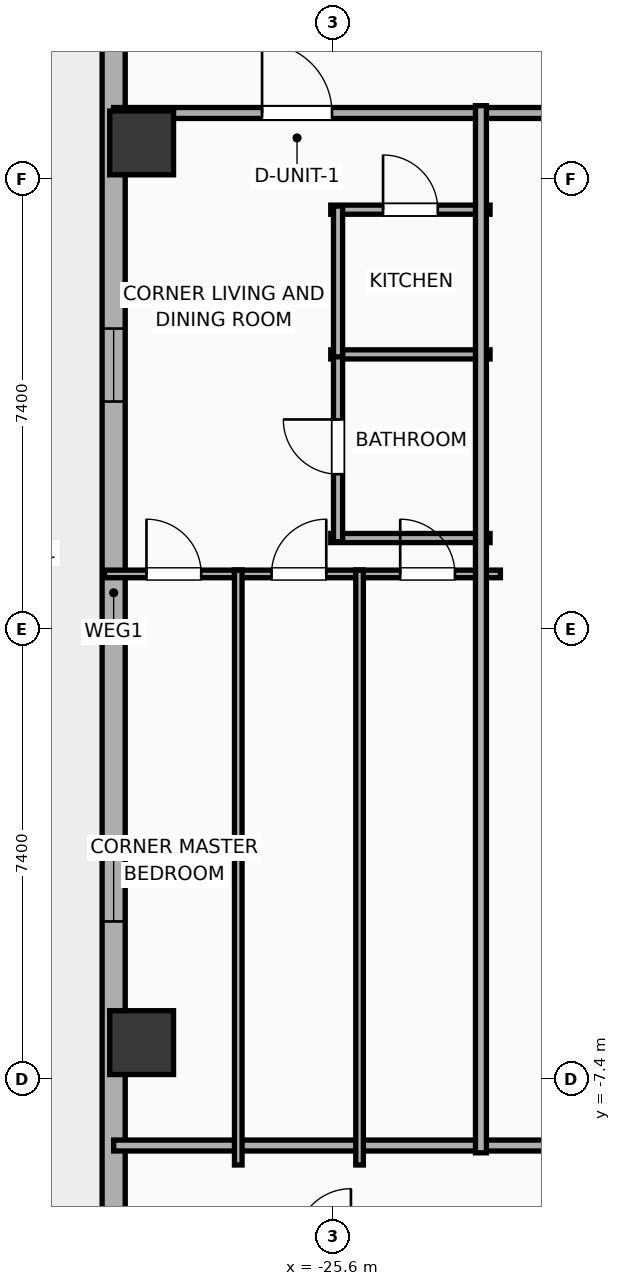
"""IFC4 building model, lengths in metres.
Left out: names, types, materials, properties, quantities, classifications, styles, units other than length and angle.
Written with IfcOpenShell. Run it as: python <this file> out.ifc"""

import sys

from ifc_helpers import new_model, si_unit, direction, frame, frame_2d, origin, origin_2d, place, context, subcontext, project, spatial, rectangle, hollow_rectangle, extrude, element, fill, save


model = new_model("IFC4")
c1 = context("Model", 3, precision=1e-05, world=origin(), true_north=direction((0.0, 1.0)))
c2 = subcontext(c1, "Body", "Model", "MODEL_VIEW")
j1 = project(units=[si_unit("LENGTHUNIT", "METRE"), si_unit("PLANEANGLEUNIT", "RADIAN")], contexts=[c1])
p1 = place(None, origin())
s1 = spatial("IfcSite", under=j1, at=p1, CompositionType="ELEMENT")
p2 = place(p1, origin())
s2 = spatial("IfcBuilding", under=s1, at=p2, CompositionType="ELEMENT")
p3 = place(p2, frame((0.0, 0.0, 113.1)))
s3 = spatial("IfcBuildingStorey", under=s2, at=p3, CompositionType="ELEMENT", Elevation=113.1)
for number, where, z_axis, x_axis in (
    (1, (-28.75, 7.998, 0.0), (0.0, 0.0, 1.0), (1.0, 0.0, 0.0)),
    (2, (-28.75, -6.798, 0.0), (0.0, 0.0, 1.0), (1.0, 0.0, 0.0)),
):
    element("IfcColumn", number, at=place(p3, frame(where, z_axis=z_axis, x_axis=x_axis)), inside=s3, PredefinedType="COLUMN", context=c2, shape_type="SweptSolid", body=[
        extrude(hollow_rectangle(XDim=1.05, YDim=1.05, WallThickness=0.036, at=origin_2d()), origin(), (0.0, 0.0, 1.0), 3.9),
    ])
p4 = place(p3, frame((-29.21, -16.581, 0.0), z_axis=(0.0, 0.0, 1.0), x_axis=(0.0, 1.0, 0.0)))
e3 = element("IfcWall", 3, at=p4, inside=s3, PredefinedType="ELEMENTEDWALL", context=c2, shape_type="SweptSolid", body=[
    extrude(rectangle(XDim=34.363, YDim=0.38, at=frame_2d((17.181, 0.0))), origin(), (0.0, 0.0, 1.0), 3.65),
])
p5 = place(p4, frame((30.757, 0.0, 0.75)))
e4 = element("IfcOpeningElement", 4, at=p5, cuts=e3, PredefinedType="OPENING", context=c2, shape_type="SweptSolid", body=[
    extrude(rectangle(XDim=1.2, YDim=2.05, at=frame_2d((0.6, 1.025))), frame((0.0, 0.2, 0.0), z_axis=(0.0, -1.0, 0.0), x_axis=(1.0, 0.0, 0.0)), (0.0, 0.0, 1.0), 0.4),
])
p6 = place(p4, frame((20.326, 0.0, 0.75)))
e5 = element("IfcOpeningElement", 5, at=p6, cuts=e3, PredefinedType="OPENING", context=c2, shape_type="SweptSolid", body=[
    extrude(rectangle(XDim=1.2, YDim=2.05, at=frame_2d((0.6, 1.025))), frame((0.0, 0.2, 0.0), z_axis=(0.0, -1.0, 0.0), x_axis=(1.0, 0.0, 0.0)), (0.0, 0.0, 1.0), 0.4),
])
p7 = place(p4, frame((11.776, 0.0, 0.75)))
e6 = element("IfcOpeningElement", 6, at=p7, cuts=e3, PredefinedType="OPENING", context=c2, shape_type="SweptSolid", body=[
    extrude(rectangle(XDim=1.2, YDim=2.05, at=frame_2d((0.6, 1.025))), frame((0.0, 0.2, 0.0), z_axis=(0.0, -1.0, 0.0), x_axis=(1.0, 0.0, 0.0)), (0.0, 0.0, 1.0), 0.4),
])
p8 = place(p3, frame((-29.21, 8.49, 0.0), z_axis=(0.0, 0.0, 1.0), x_axis=(1.0, 0.0, 0.0)))
e7 = element("IfcWall", 7, at=p8, inside=s3, PredefinedType="PARTITIONING", context=c2, shape_type="SweptSolid", body=[
    extrude(rectangle(XDim=19.33, YDim=0.18, at=frame_2d((9.665, 0.0))), origin(), (0.0, 0.0, 1.0), 3.65),
])
p9 = place(p8, frame((2.44, 0.0, 0.0)))
e8 = element("IfcOpeningElement", 8, at=p9, cuts=e7, PredefinedType="OPENING", context=c2, shape_type="SweptSolid", body=[
    extrude(rectangle(XDim=1.15, YDim=2.05, at=frame_2d((0.575, 1.025))), frame((0.0, 0.1, 0.0), z_axis=(0.0, -1.0, 0.0), x_axis=(1.0, 0.0, 0.0)), (0.0, 0.0, 1.0), 0.2),
])
p10 = place(p3, frame((-29.21, -8.49, 0.0), z_axis=(0.0, 0.0, 1.0), x_axis=(1.0, 0.0, 0.0)))
e9 = element("IfcWall", 9, at=p10, inside=s3, PredefinedType="PARTITIONING", context=c2, shape_type="SweptSolid", body=[
    extrude(rectangle(XDim=19.33, YDim=0.18, at=frame_2d((9.665, 0.0))), origin(), (0.0, 0.0, 1.0), 3.65),
])
p11 = place(p3, frame((-25.64, 6.9, 0.0), z_axis=(0.0, 0.0, 1.0), x_axis=(1.0, 0.0, 0.0)))
e10 = element("IfcWall", 10, at=p11, inside=s3, PredefinedType="PLUMBINGWALL", context=c2, shape_type="SweptSolid", body=[
    extrude(rectangle(XDim=2.62, YDim=0.15, at=frame_2d((1.31, 0.0))), origin(), (0.0, 0.0, 1.0), 3.65),
])
p12 = place(p11, frame((0.86, 0.0, 0.0)))
e11 = element("IfcOpeningElement", 11, at=p12, cuts=e10, PredefinedType="OPENING", context=c2, shape_type="SweptSolid", body=[
    extrude(rectangle(XDim=0.9, YDim=2.05, at=frame_2d((0.45, 1.025))), frame((0.0, 0.085, 0.0), z_axis=(0.0, -1.0, 0.0), x_axis=(1.0, 0.0, 0.0)), (0.0, 0.0, 1.0), 0.17),
])
for number, where, z_axis, x_axis in (
    (12, (-25.64, 4.52, 0.0), (0.0, 0.0, 1.0), (1.0, 0.0, 0.0)),
    (13, (-25.64, 1.5, 0.0), (0.0, 0.0, 1.0), (1.0, 0.0, 0.0)),
):
    element("IfcWall", number, at=place(p3, frame(where, z_axis=z_axis, x_axis=x_axis)), inside=s3, PredefinedType="PLUMBINGWALL", context=c2, shape_type="SweptSolid", body=[
        extrude(rectangle(XDim=2.62, YDim=0.15, at=frame_2d((1.31, 0.0))), origin(), (0.0, 0.0, 1.0), 3.65),
    ])
p13 = place(p3, frame((-25.52, 1.44, 0.0), z_axis=(0.0, 0.0, 1.0), x_axis=(0.0, 1.0, 0.0)))
e14 = element("IfcWall", 14, at=p13, inside=s3, PredefinedType="PLUMBINGWALL", context=c2, shape_type="SweptSolid", body=[
    extrude(rectangle(XDim=3.12, YDim=0.15, at=frame_2d((1.56, 0.0))), origin(), (0.0, 0.0, 1.0), 3.65),
])
p14 = place(p13, frame((1.11, 0.0, 0.0)))
e15 = element("IfcOpeningElement", 15, at=p14, cuts=e14, PredefinedType="OPENING", context=c2, shape_type="SweptSolid", body=[
    extrude(rectangle(XDim=0.9, YDim=2.05, at=frame_2d((0.45, 1.025))), frame((0.0, 0.085, 0.0), z_axis=(0.0, -1.0, 0.0), x_axis=(1.0, 0.0, 0.0)), (0.0, 0.0, 1.0), 0.17),
])
p15 = place(p3, frame((-25.52, 4.48, 0.0), z_axis=(0.0, 0.0, 1.0), x_axis=(0.0, 1.0, 0.0)))
e16 = element("IfcWall", 16, at=p15, inside=s3, PredefinedType="PLUMBINGWALL", context=c2, shape_type="SweptSolid", body=[
    extrude(rectangle(XDim=2.48, YDim=0.15, at=frame_2d((1.24, 0.0))), origin(), (0.0, 0.0, 1.0), 3.65),
])
p16 = place(p3, frame((-29.36, 0.91, 0.0), z_axis=(0.0, 0.0, 1.0), x_axis=(1.0, 0.0, 0.0)))
e17 = element("IfcWall", 17, at=p16, inside=s3, PredefinedType="PARTITIONING", context=c2, shape_type="SweptSolid", body=[
    extrude(rectangle(XDim=2.262, YDim=0.125, at=frame_2d((1.131, 0.0))), origin(), (0.0, 0.0, 1.0), 3.65),
])
p17 = place(p16, frame((0.689, 0.0, 0.0)))
e18 = element("IfcOpeningElement", 18, at=p17, cuts=e17, PredefinedType="OPENING", context=c2, shape_type="SweptSolid", body=[
    extrude(rectangle(XDim=0.9, YDim=2.05, at=frame_2d((0.45, 1.025))), frame((0.0, 0.073, 0.0), z_axis=(0.0, -1.0, 0.0), x_axis=(1.0, 0.0, 0.0)), (0.0, 0.0, 1.0), 0.145),
])
p18 = place(p3, frame((-27.223, 0.91, 0.0), z_axis=(0.0, 0.0, 1.0), x_axis=(1.0, 0.0, 0.0)))
e19 = element("IfcWall", 19, at=p18, inside=s3, PredefinedType="PARTITIONING", context=c2, shape_type="SweptSolid", body=[
    extrude(rectangle(XDim=2.12, YDim=0.125, at=frame_2d((1.06, 0.0))), origin(), (0.0, 0.0, 1.0), 3.65),
])
p19 = place(p18, frame((0.61, 0.0, 0.0)))
e20 = element("IfcOpeningElement", 20, at=p19, cuts=e19, PredefinedType="OPENING", context=c2, shape_type="SweptSolid", body=[
    extrude(rectangle(XDim=0.9, YDim=2.05, at=frame_2d((0.45, 1.025))), frame((0.0, 0.073, 0.0), z_axis=(0.0, -1.0, 0.0), x_axis=(1.0, 0.0, 0.0)), (0.0, 0.0, 1.0), 0.145),
])
p20 = place(p3, frame((-25.229, 0.91, 0.0), z_axis=(0.0, 0.0, 1.0), x_axis=(1.0, 0.0, 0.0)))
e21 = element("IfcWall", 21, at=p20, inside=s3, PredefinedType="PARTITIONING", context=c2, shape_type="SweptSolid", body=[
    extrude(rectangle(XDim=2.378, YDim=0.125, at=frame_2d((1.189, 0.0))), origin(), (0.0, 0.0, 1.0), 3.65),
])
p21 = place(p20, frame((0.73, 0.0, 0.0)))
e22 = element("IfcOpeningElement", 22, at=p21, cuts=e21, PredefinedType="OPENING", context=c2, shape_type="SweptSolid", body=[
    extrude(rectangle(XDim=0.9, YDim=2.05, at=frame_2d((0.45, 1.025))), frame((0.0, 0.073, 0.0), z_axis=(0.0, -1.0, 0.0), x_axis=(1.0, 0.0, 0.0)), (0.0, 0.0, 1.0), 0.145),
])
for number, where, z_axis, x_axis in (
    (23, (-25.166, -8.81, 0.0), (0.0, 0.0, 1.0), (0.0, 1.0, 0.0)),
    (24, (-27.161, -8.81, 0.0), (0.0, 0.0, 1.0), (0.0, 1.0, 0.0)),
):
    element("IfcWall", number, at=place(p3, frame(where, z_axis=z_axis, x_axis=x_axis)), inside=s3, PredefinedType="PARTITIONING", context=c2, shape_type="SweptSolid", body=[
        extrude(rectangle(XDim=9.78, YDim=0.125, at=frame_2d((4.89, 0.0))), origin(), (0.0, 0.0, 1.0), 3.65),
    ])
p22 = place(p3, frame((-23.17, -8.61, 0.0), z_axis=(0.0, 0.0, 1.0), x_axis=(0.0, 1.0, 0.0)))
e25 = element("IfcWall", 25, at=p22, inside=s3, PredefinedType="PARTITIONING", context=c2, shape_type="SweptSolid", body=[
    extrude(rectangle(XDim=17.22, YDim=0.18, at=frame_2d((8.61, 0.0))), origin(), (0.0, 0.0, 1.0), 3.65),
])
p23 = place(p6, origin())
e26 = element("IfcWindow", 26, at=p23, inside=s3, PartitioningType="SINGLE_PANEL", PredefinedType="WINDOW", context=c2, shape_type="SweptSolid", body=[
    extrude(rectangle(XDim=1.2, YDim=2.05, at=frame_2d((0.6, 1.025))), frame((0.0, 0.03, 0.0), z_axis=(0.0, -1.0, 0.0), x_axis=(1.0, 0.0, 0.0)), (0.0, 0.0, 1.0), 0.06),
])
fill(e5, e26)
p24 = place(p7, origin())
e27 = element("IfcWindow", 27, at=p24, inside=s3, PartitioningType="SINGLE_PANEL", PredefinedType="WINDOW", context=c2, shape_type="SweptSolid", body=[
    extrude(rectangle(XDim=1.2, YDim=2.05, at=frame_2d((0.6, 1.025))), frame((0.0, 0.03, 0.0), z_axis=(0.0, -1.0, 0.0), x_axis=(1.0, 0.0, 0.0)), (0.0, 0.0, 1.0), 0.06),
])
fill(e6, e27)
p25 = place(p9, origin())
e28 = element("IfcDoor", 28, at=p25, inside=s3, OperationType="SINGLE_SWING_LEFT", PredefinedType="DOOR", context=c2, shape_type="SweptSolid", body=[
    extrude(rectangle(XDim=1.15, YDim=2.05, at=frame_2d((0.575, 1.025))), frame((0.0, 0.025, 0.0), z_axis=(0.0, -1.0, 0.0), x_axis=(1.0, 0.0, 0.0)), (0.0, 0.0, 1.0), 0.05),
])
fill(e8, e28)
p26 = place(p12, origin())
e29 = element("IfcDoor", 29, at=p26, inside=s3, OperationType="SINGLE_SWING_LEFT", PredefinedType="DOOR", context=c2, shape_type="SweptSolid", body=[
    extrude(rectangle(XDim=0.9, YDim=2.05, at=frame_2d((0.45, 1.025))), frame((0.0, 0.025, 0.0), z_axis=(0.0, -1.0, 0.0), x_axis=(1.0, 0.0, 0.0)), (0.0, 0.0, 1.0), 0.05),
])
fill(e11, e29)
p27 = place(p14, origin())
e30 = element("IfcDoor", 30, at=p27, inside=s3, OperationType="SINGLE_SWING_RIGHT", PredefinedType="DOOR", context=c2, shape_type="SweptSolid", body=[
    extrude(rectangle(XDim=0.9, YDim=2.05, at=frame_2d((0.45, 1.025))), frame((0.0, 0.025, 0.0), z_axis=(0.0, -1.0, 0.0), x_axis=(1.0, 0.0, 0.0)), (0.0, 0.0, 1.0), 0.05),
])
fill(e15, e30)
p28 = place(p17, origin())
e31 = element("IfcDoor", 31, at=p28, inside=s3, OperationType="SINGLE_SWING_LEFT", PredefinedType="DOOR", context=c2, shape_type="SweptSolid", body=[
    extrude(rectangle(XDim=0.9, YDim=2.05, at=frame_2d((0.45, 1.025))), frame((0.0, 0.025, 0.0), z_axis=(0.0, -1.0, 0.0), x_axis=(1.0, 0.0, 0.0)), (0.0, 0.0, 1.0), 0.05),
])
fill(e18, e31)
p29 = place(p19, origin())
e32 = element("IfcDoor", 32, at=p29, inside=s3, OperationType="SINGLE_SWING_RIGHT", PredefinedType="DOOR", context=c2, shape_type="SweptSolid", body=[
    extrude(rectangle(XDim=0.9, YDim=2.05, at=frame_2d((0.45, 1.025))), frame((0.0, 0.025, 0.0), z_axis=(0.0, -1.0, 0.0), x_axis=(1.0, 0.0, 0.0)), (0.0, 0.0, 1.0), 0.05),
])
fill(e20, e32)
p30 = place(p21, origin())
e33 = element("IfcDoor", 33, at=p30, inside=s3, OperationType="SINGLE_SWING_LEFT", PredefinedType="DOOR", context=c2, shape_type="SweptSolid", body=[
    extrude(rectangle(XDim=0.9, YDim=2.05, at=frame_2d((0.45, 1.025))), frame((0.0, 0.025, 0.0), z_axis=(0.0, -1.0, 0.0), x_axis=(1.0, 0.0, 0.0)), (0.0, 0.0, 1.0), 0.05),
])
fill(e22, e33)
save(model, sys.argv[1])
